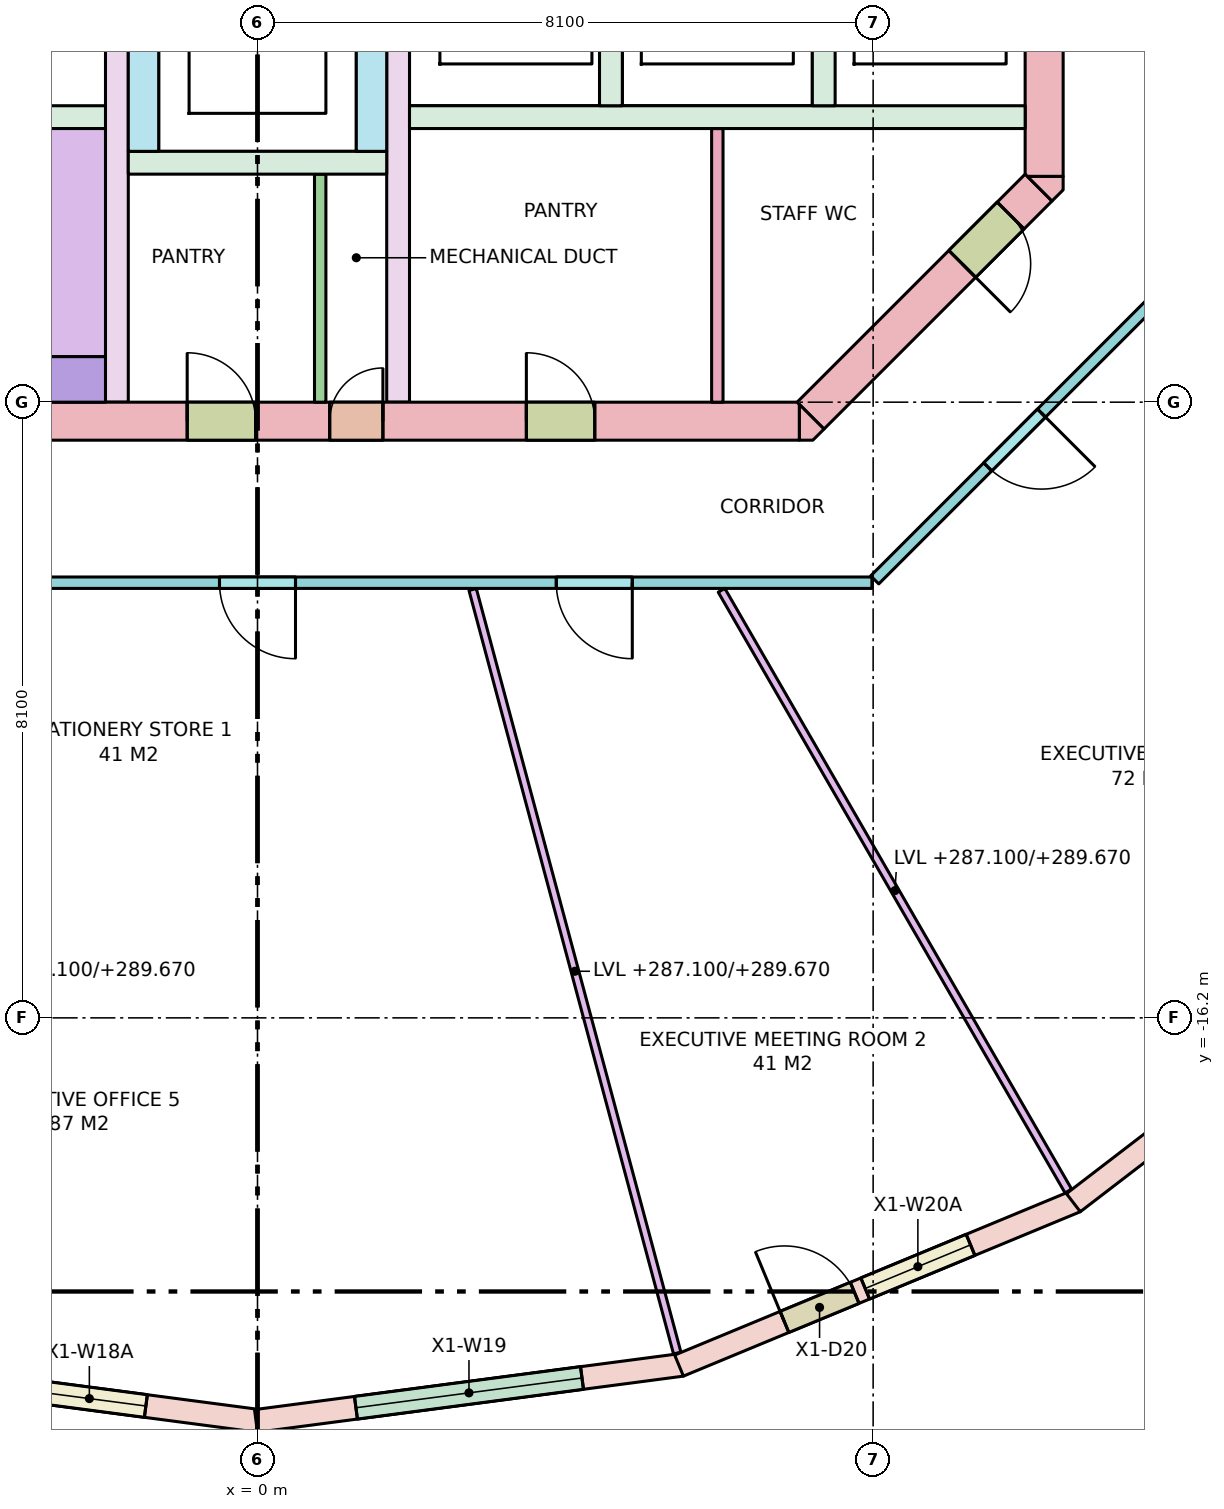
"""IFC4 building model, lengths in metres.
Left out: names, types, materials, properties, quantities, classifications, styles, units other than length and angle.
Written with IfcOpenShell. Run it as: python <this file> out.ifc"""

import sys

from ifc_helpers import new_model, si_unit, direction, frame, frame_2d, origin, place, context, subcontext, project, spatial, polyline, rectangle, outline, extrude, element, fill, save


model = new_model("IFC4")
c1 = context("Model", 3, precision=1e-05, world=origin(), true_north=direction((0.0, 1.0)))
c2 = subcontext(c1, "Body", "Model", "MODEL_VIEW")
j1 = project(units=[si_unit("LENGTHUNIT", "METRE"), si_unit("PLANEANGLEUNIT", "RADIAN")], contexts=[c1])
p1 = place(None, origin())
s1 = spatial("IfcSite", under=j1, at=p1, CompositionType="ELEMENT")
p2 = place(p1, origin())
s2 = spatial("IfcBuilding", under=s1, at=p2, CompositionType="ELEMENT")
p3 = place(p2, frame((0.0, 0.0, 287.1)))
s3 = spatial("IfcBuildingStorey", under=s2, at=p3, CompositionType="ELEMENT", Elevation=287.1)
p4 = place(p3, frame((-7.13, -8.35, -0.28), z_axis=(0.0, 0.0, 1.0), x_axis=(1.0, 0.0, 0.0)))
e1 = element("IfcWall", 1, at=p4, inside=s3, PredefinedType="SHEAR", context=c2, shape_type="SweptSolid", body=[
    extrude(rectangle(XDim=14.26, YDim=0.5, at=frame_2d((7.13, 0.0))), origin(), (0.0, 0.0, 1.0), 3.7),
])
p5 = place(p4, frame((8.08, 0.0, 0.28)))
e2 = element("IfcOpeningElement", 2, at=p5, cuts=e1, PredefinedType="OPENING", context=c2, shape_type="SweptSolid", body=[
    extrude(rectangle(XDim=0.7, YDim=2.1, at=frame_2d((0.35, 1.05))), frame((0.0, 0.26, 0.0), z_axis=(0.0, -1.0, 0.0), x_axis=(1.0, 0.0, 0.0)), (0.0, 0.0, 1.0), 0.52),
])
p6 = place(p4, frame((6.205, 0.0, 0.28)))
e3 = element("IfcOpeningElement", 3, at=p6, cuts=e1, PredefinedType="OPENING", context=c2, shape_type="SweptSolid", body=[
    extrude(rectangle(XDim=0.9, YDim=2.1, at=frame_2d((0.45, 1.05))), frame((0.0, 0.26, 0.0), z_axis=(0.0, -1.0, 0.0), x_axis=(1.0, 0.0, 0.0)), (0.0, 0.0, 1.0), 0.52),
])
p7 = place(p4, frame((10.667, 0.0, 0.28)))
e4 = element("IfcOpeningElement", 4, at=p7, cuts=e1, PredefinedType="OPENING", context=c2, shape_type="SweptSolid", body=[
    extrude(rectangle(XDim=0.9, YDim=2.1, at=frame_2d((0.45, 1.05))), frame((0.0, 0.26, 0.0), z_axis=(0.0, -1.0, 0.0), x_axis=(1.0, 0.0, 0.0)), (0.0, 0.0, 1.0), 0.52),
])
p8 = place(p3, frame((10.35, -5.13, -0.28), z_axis=(0.0, 0.0, 1.0), x_axis=(0.0, 1.0, 0.0)))
e5 = element("IfcWall", 5, at=p8, inside=s3, PredefinedType="SHEAR", context=c2, shape_type="SweptSolid", body=[
    extrude(rectangle(XDim=10.26, YDim=0.5, at=frame_2d((5.13, 0.0))), origin(), (0.0, 0.0, 1.0), 3.7),
])
p9 = place(p8, frame((4.13, 0.0, 0.28)))
e6 = element("IfcOpeningElement", 6, at=p9, cuts=e5, PredefinedType="OPENING", context=c2, shape_type="SweptSolid", body=[
    extrude(rectangle(XDim=2.0, YDim=2.1, at=frame_2d((1.0, 1.05))), frame((0.0, 0.26, 0.0), z_axis=(0.0, -1.0, 0.0), x_axis=(1.0, 0.0, 0.0)), (0.0, 0.0, 1.0), 0.52),
])
p10 = place(p3, frame((10.277, -5.277, -0.28), z_axis=(0.0, 0.0, 1.0), x_axis=(-0.707106781187, -0.707106781187, 0.0)))
e7 = element("IfcWall", 7, at=p10, inside=s3, PredefinedType="SHEAR", context=c2, shape_type="SweptSolid", body=[
    extrude(rectangle(XDim=4.243, YDim=0.5, at=frame_2d((2.121, 0.0))), origin(), (0.0, 0.0, 1.0), 3.7),
])
p11 = place(p10, frame((0.52, 0.0, 0.28)))
e8 = element("IfcOpeningElement", 8, at=p11, cuts=e7, PredefinedType="OPENING", context=c2, shape_type="SweptSolid", body=[
    extrude(rectangle(XDim=0.9, YDim=2.1, at=frame_2d((0.45, 1.05))), frame((0.0, 0.26, 0.0), z_axis=(0.0, -1.0, 0.0), x_axis=(1.0, 0.0, 0.0)), (0.0, 0.0, 1.0), 0.52),
])
p12 = place(p3, frame((0.0, 0.0, -0.28)))
e9 = element("IfcWall", 9, at=p12, inside=s3, PredefinedType="SHEAR", context=c2, shape_type="SweptSolid", body=[
    extrude(outline(polyline([(7.307, -8.6), (7.13, -8.6), (7.13, -8.13), (7.454, -8.454), (7.307, -8.6)])), origin(), (0.0, 0.0, 1.0), 3.7),
])
p13 = place(p3, frame((0.0, 0.0, -0.28)))
e10 = element("IfcWall", 10, at=p13, inside=s3, PredefinedType="SHEAR", context=c2, shape_type="SweptSolid", body=[
    extrude(outline(polyline([(10.6, -5.307), (10.454, -5.454), (10.13, -5.13), (10.6, -5.13), (10.6, -5.307)])), origin(), (0.0, 0.0, 1.0), 3.7),
])
for number, where, z_axis, x_axis in (
    (11, (-10.1, -4.35, 0.0), (0.0, 0.0, 1.0), (1.0, 0.0, 0.0)),
    (12, (2.0, -4.35, 0.0), (0.0, 0.0, 1.0), (1.0, 0.0, 0.0)),
):
    element("IfcWall", number, at=place(p3, frame(where, z_axis=z_axis, x_axis=x_axis)), inside=s3, PredefinedType="SOLIDWALL", context=c2, shape_type="SweptSolid", body=[
        extrude(rectangle(XDim=8.1, YDim=0.3, at=frame_2d((4.05, 0.0))), origin(), (0.0, 0.0, 1.0), 3.42),
    ])
for number, where, z_axis, x_axis in (
    (13, (4.65, -4.2, 0.0), (0.0, 0.0, 1.0), (0.0, 1.0, 0.0)),
    (14, (7.45, -4.2, 0.0), (0.0, 0.0, 1.0), (0.0, 1.0, 0.0)),
):
    element("IfcWall", number, at=place(p3, frame(where, z_axis=z_axis, x_axis=x_axis)), inside=s3, PredefinedType="SOLIDWALL", context=c2, shape_type="SweptSolid", body=[
        extrude(rectangle(XDim=2.4, YDim=0.3, at=frame_2d((1.2, 0.0))), origin(), (0.0, 0.0, 1.0), 3.42),
    ])
for number, where, z_axis, x_axis in (
    (15, (-1.85, -8.1, 0.0), (0.0, 0.0, 1.0), (0.0, 1.0, 0.0)),
    (16, (1.85, -8.1, 0.0), (0.0, 0.0, 1.0), (0.0, 1.0, 0.0)),
):
    element("IfcWall", number, at=place(p3, frame(where, z_axis=z_axis, x_axis=x_axis)), inside=s3, PredefinedType="SHEAR", context=c2, shape_type="SweptSolid", body=[
        extrude(rectangle(XDim=6.6, YDim=0.3, at=frame_2d((3.3, 0.0))), origin(), (0.0, 0.0, 1.0), 3.42),
    ])
for number, where, z_axis, x_axis in (
    (17, (-1.5, -4.8, 0.0), (0.0, 0.0, 1.0), (0.0, 1.0, 0.0)),
    (18, (1.5, -4.8, 0.0), (0.0, 0.0, 1.0), (0.0, 1.0, 0.0)),
):
    element("IfcWall", number, at=place(p3, frame(where, z_axis=z_axis, x_axis=x_axis)), inside=s3, PredefinedType="SOLIDWALL", context=c2, shape_type="SweptSolid", body=[
        extrude(rectangle(XDim=3.0, YDim=0.4, at=frame_2d((1.5, 0.0))), origin(), (0.0, 0.0, 1.0), 3.42),
    ])
p14 = place(p3, frame((-1.7, -4.95, 0.0), z_axis=(0.0, 0.0, 1.0), x_axis=(1.0, 0.0, 0.0)))
e19 = element("IfcWall", 19, at=p14, inside=s3, PredefinedType="SOLIDWALL", context=c2, shape_type="SweptSolid", body=[
    extrude(rectangle(XDim=3.4, YDim=0.3, at=frame_2d((1.7, 0.0))), origin(), (0.0, 0.0, 1.0), 3.42),
])
p15 = place(p3, frame((-7.37, -7.8, 0.0), z_axis=(0.0, 0.0, 1.0), x_axis=(1.0, 0.0, 0.0)))
e20 = element("IfcWall", 20, at=p15, inside=s3, PredefinedType="SHEAR", context=c2, shape_type="SweptSolid", body=[
    extrude(rectangle(XDim=5.37, YDim=0.6, at=frame_2d((2.685, 0.0))), origin(), (0.0, 0.0, 1.0), 3.42),
])
p16 = place(p3, frame((-5.584, -20.765, 0.0), z_axis=(0.0, 0.0, 1.0), x_axis=(0.991443853938, -0.130533844229, 0.0)))
e21 = element("IfcWall", 21, at=p16, inside=s3, PredefinedType="STANDARD", context=c2, shape_type="SweptSolid", body=[
    extrude(rectangle(XDim=5.652, YDim=0.3, at=frame_2d((2.826, 0.0))), origin(), (0.0, 0.0, 1.0), 3.42),
])
p17 = place(p16, frame((1.501, 0.0, 0.0)))
e22 = element("IfcOpeningElement", 22, at=p17, cuts=e21, PredefinedType="OPENING", context=c2, shape_type="SweptSolid", body=[
    extrude(rectangle(XDim=1.0, YDim=2.4, at=frame_2d((0.5, 1.2))), frame((0.0, 0.16, 0.0), z_axis=(0.0, -1.0, 0.0), x_axis=(1.0, 0.0, 0.0)), (0.0, 0.0, 1.0), 0.32),
])
p18 = place(p16, frame((2.651, 0.0, 0.8)))
e23 = element("IfcOpeningElement", 23, at=p18, cuts=e21, PredefinedType="OPENING", context=c2, shape_type="SweptSolid", body=[
    extrude(rectangle(XDim=1.5, YDim=2.4, at=frame_2d((0.75, 1.2))), frame((0.0, 0.16, 0.0), z_axis=(0.0, -1.0, 0.0), x_axis=(1.0, 0.0, 0.0)), (0.0, 0.0, 1.0), 0.32),
])
p19 = place(p3, frame((-0.02, -21.503, 0.0), z_axis=(0.0, 0.0, 1.0), x_axis=(0.991443853938, 0.130533844229, 0.0)))
e24 = element("IfcWall", 24, at=p19, inside=s3, PredefinedType="STANDARD", context=c2, shape_type="SweptSolid", body=[
    extrude(rectangle(XDim=5.652, YDim=0.3, at=frame_2d((2.826, 0.0))), origin(), (0.0, 0.0, 1.0), 3.42),
])
p20 = place(p19, frame((1.326, 0.0, 0.8)))
e25 = element("IfcOpeningElement", 25, at=p20, cuts=e24, PredefinedType="OPENING", context=c2, shape_type="SweptSolid", body=[
    extrude(rectangle(XDim=3.0, YDim=2.4, at=frame_2d((1.5, 1.2))), frame((0.0, 0.16, 0.0), z_axis=(0.0, -1.0, 0.0), x_axis=(1.0, 0.0, 0.0)), (0.0, 0.0, 1.0), 0.32),
])
p21 = place(p3, frame((5.546, -20.775, 0.0), z_axis=(0.0, 0.0, 1.0), x_axis=(0.923888907244, 0.382660798975, 0.0)))
e26 = element("IfcWall", 26, at=p21, inside=s3, PredefinedType="STANDARD", context=c2, shape_type="SweptSolid", body=[
    extrude(rectangle(XDim=5.652, YDim=0.3, at=frame_2d((2.826, 0.0))), origin(), (0.0, 0.0, 1.0), 3.42),
])
p22 = place(p21, frame((1.501, 0.0, 0.0)))
e27 = element("IfcOpeningElement", 27, at=p22, cuts=e26, PredefinedType="OPENING", context=c2, shape_type="SweptSolid", body=[
    extrude(rectangle(XDim=1.0, YDim=2.4, at=frame_2d((0.5, 1.2))), frame((0.0, 0.16, 0.0), z_axis=(0.0, -1.0, 0.0), x_axis=(1.0, 0.0, 0.0)), (0.0, 0.0, 1.0), 0.32),
])
p23 = place(p21, frame((2.651, 0.0, 0.8)))
e28 = element("IfcOpeningElement", 28, at=p23, cuts=e26, PredefinedType="OPENING", context=c2, shape_type="SweptSolid", body=[
    extrude(rectangle(XDim=1.5, YDim=2.4, at=frame_2d((0.75, 1.2))), frame((0.0, 0.16, 0.0), z_axis=(0.0, -1.0, 0.0), x_axis=(1.0, 0.0, 0.0)), (0.0, 0.0, 1.0), 0.32),
])
p24 = place(p3, frame((10.734, -18.632, 0.0), z_axis=(0.0, 0.0, 1.0), x_axis=(0.793363662257, 0.608747976925, 0.0)))
e29 = element("IfcWall", 29, at=p24, inside=s3, PredefinedType="STANDARD", context=c2, shape_type="SweptSolid", body=[
    extrude(rectangle(XDim=5.652, YDim=0.3, at=frame_2d((2.826, 0.0))), origin(), (0.0, 0.0, 1.0), 3.42),
])
p25 = place(p24, frame((1.326, 0.0, 0.8)))
e30 = element("IfcOpeningElement", 30, at=p25, cuts=e29, PredefinedType="OPENING", context=c2, shape_type="SweptSolid", body=[
    extrude(rectangle(XDim=3.0, YDim=2.4, at=frame_2d((1.5, 1.2))), frame((0.0, 0.16, 0.0), z_axis=(0.0, -1.0, 0.0), x_axis=(1.0, 0.0, 0.0)), (0.0, 0.0, 1.0), 0.32),
])
p26 = place(p3, frame((0.825, -8.1, 0.0), z_axis=(0.0, 0.0, 1.0), x_axis=(0.0, 1.0, 0.0)))
e31 = element("IfcWall", 31, at=p26, inside=s3, PredefinedType="PARTITIONING", context=c2, shape_type="SweptSolid", body=[
    extrude(rectangle(XDim=3.0, YDim=0.15, at=frame_2d((1.5, 0.0))), origin(), (0.0, 0.0, 1.0), 3.42),
])
p27 = place(p3, frame((6.05, -8.1, 0.0), z_axis=(0.0, 0.0, 1.0), x_axis=(0.0, 1.0, 0.0)))
e32 = element("IfcWall", 32, at=p27, inside=s3, PredefinedType="PARTITIONING", context=c2, shape_type="SweptSolid", body=[
    extrude(rectangle(XDim=3.6, YDim=0.15, at=frame_2d((1.8, 0.0))), origin(), (0.0, 0.0, 1.0), 3.42),
])
p28 = place(p3, frame((12.438, -6.121, 0.0), z_axis=(0.0, 0.0, 1.0), x_axis=(-0.707106781187, -0.707106781187, 0.0)))
e33 = element("IfcWall", 33, at=p28, inside=s3, PredefinedType="PARTITIONING", context=c2, shape_type="SweptSolid", body=[
    extrude(rectangle(XDim=6.105, YDim=0.15, at=frame_2d((3.053, 0.0))), origin(), (0.0, 0.0, 1.0), 2.57),
])
p29 = place(p28, frame((3.002, 0.0, 0.0)))
e34 = element("IfcOpeningElement", 34, at=p29, cuts=e33, PredefinedType="OPENING", context=c2, shape_type="SweptSolid", body=[
    extrude(rectangle(XDim=1.0, YDim=2.1, at=frame_2d((0.5, 1.05))), frame((0.0, 0.085, 0.0), z_axis=(0.0, -1.0, 0.0), x_axis=(1.0, 0.0, 0.0)), (0.0, 0.0, 1.0), 0.17),
])
p30 = place(p3, frame((8.084, -10.475, 0.0), z_axis=(0.0, 0.0, 1.0), x_axis=(-1.0, 0.0, 0.0)))
e35 = element("IfcWall", 35, at=p30, inside=s3, PredefinedType="PARTITIONING", context=c2, shape_type="SweptSolid", body=[
    extrude(rectangle(XDim=16.167, YDim=0.15, at=frame_2d((8.084, 0.0))), origin(), (0.0, 0.0, 1.0), 2.57),
])
p31 = place(p30, frame((12.065, 0.0, 0.0)))
e36 = element("IfcOpeningElement", 36, at=p31, cuts=e35, PredefinedType="OPENING", context=c2, shape_type="SweptSolid", body=[
    extrude(rectangle(XDim=0.9, YDim=2.1, at=frame_2d((0.45, 1.05))), frame((0.0, 0.085, 0.0), z_axis=(0.0, -1.0, 0.0), x_axis=(1.0, 0.0, 0.0)), (0.0, 0.0, 1.0), 0.17),
])
p32 = place(p30, frame((7.584, 0.0, 0.0)))
e37 = element("IfcOpeningElement", 37, at=p32, cuts=e35, PredefinedType="OPENING", context=c2, shape_type="SweptSolid", body=[
    extrude(rectangle(XDim=1.0, YDim=2.1, at=frame_2d((0.5, 1.05))), frame((0.0, 0.085, 0.0), z_axis=(0.0, -1.0, 0.0), x_axis=(1.0, 0.0, 0.0)), (0.0, 0.0, 1.0), 0.17),
])
p33 = place(p30, frame((3.153, 0.0, 0.0)))
e38 = element("IfcOpeningElement", 38, at=p33, cuts=e35, PredefinedType="OPENING", context=c2, shape_type="SweptSolid", body=[
    extrude(rectangle(XDim=1.0, YDim=2.1, at=frame_2d((0.5, 1.05))), frame((0.0, 0.085, 0.0), z_axis=(0.0, -1.0, 0.0), x_axis=(1.0, 0.0, 0.0)), (0.0, 0.0, 1.0), 0.17),
])
p34 = place(p3, frame((2.831, -10.564, 0.0), z_axis=(0.0, 0.0, 1.0), x_axis=(0.258796321138, -0.965931914871, 0.0)))
e39 = element("IfcWall", 39, at=p34, inside=s3, PredefinedType="PARTITIONING", context=c2, shape_type="SweptSolid", body=[
    extrude(rectangle(XDim=10.4, YDim=0.1, at=frame_2d((5.2, 0.0))), origin(), (0.0, 0.0, 1.0), 2.57),
])
p35 = place(p3, frame((6.105, -10.575, 0.0), z_axis=(0.0, 0.0, 1.0), x_axis=(0.500020406621, -0.866013621696, 0.0)))
e40 = element("IfcWall", 40, at=p35, inside=s3, PredefinedType="PARTITIONING", context=c2, shape_type="SweptSolid", body=[
    extrude(rectangle(XDim=9.126, YDim=0.1, at=frame_2d((4.563, 0.0))), origin(), (0.0, 0.0, 1.0), 2.57),
])
p36 = place(p18, origin())
e41 = element("IfcWindow", 41, at=p36, inside=s3, PartitioningType="SINGLE_PANEL", PredefinedType="WINDOW", context=c2, shape_type="SweptSolid", body=[
    extrude(rectangle(XDim=1.5, YDim=2.4, at=frame_2d((0.75, 1.2))), frame((0.0, 0.03, 0.0), z_axis=(0.0, -1.0, 0.0), x_axis=(1.0, 0.0, 0.0)), (0.0, 0.0, 1.0), 0.06),
])
fill(e23, e41)
p37 = place(p20, origin())
e42 = element("IfcWindow", 42, at=p37, inside=s3, PartitioningType="SINGLE_PANEL", PredefinedType="WINDOW", context=c2, shape_type="SweptSolid", body=[
    extrude(rectangle(XDim=3.0, YDim=2.4, at=frame_2d((1.5, 1.2))), frame((0.0, 0.03, 0.0), z_axis=(0.0, -1.0, 0.0), x_axis=(1.0, 0.0, 0.0)), (0.0, 0.0, 1.0), 0.06),
])
fill(e25, e42)
p38 = place(p22, origin())
e43 = element("IfcDoor", 43, at=p38, inside=s3, OperationType="SINGLE_SWING_LEFT", PredefinedType="DOOR", context=c2, shape_type="SweptSolid", body=[
    extrude(rectangle(XDim=1.0, YDim=2.4, at=frame_2d((0.5, 1.2))), frame((0.0, 0.025, 0.0), z_axis=(0.0, -1.0, 0.0), x_axis=(1.0, 0.0, 0.0)), (0.0, 0.0, 1.0), 0.05),
])
fill(e27, e43)
p39 = place(p23, origin())
e44 = element("IfcWindow", 44, at=p39, inside=s3, PartitioningType="SINGLE_PANEL", PredefinedType="WINDOW", context=c2, shape_type="SweptSolid", body=[
    extrude(rectangle(XDim=1.5, YDim=2.4, at=frame_2d((0.75, 1.2))), frame((0.0, 0.03, 0.0), z_axis=(0.0, -1.0, 0.0), x_axis=(1.0, 0.0, 0.0)), (0.0, 0.0, 1.0), 0.06),
])
fill(e28, e44)
p40 = place(p5, origin())
e45 = element("IfcDoor", 45, at=p40, inside=s3, OperationType="SINGLE_SWING_RIGHT", PredefinedType="DOOR", context=c2, shape_type="SweptSolid", body=[
    extrude(rectangle(XDim=0.7, YDim=2.1, at=frame_2d((0.35, 1.05))), frame((0.0, 0.025, 0.0), z_axis=(0.0, -1.0, 0.0), x_axis=(1.0, 0.0, 0.0)), (0.0, 0.0, 1.0), 0.05),
])
fill(e2, e45)
p41 = place(p6, origin())
e46 = element("IfcDoor", 46, at=p41, inside=s3, OperationType="SINGLE_SWING_LEFT", PredefinedType="DOOR", context=c2, shape_type="SweptSolid", body=[
    extrude(rectangle(XDim=0.9, YDim=2.1, at=frame_2d((0.45, 1.05))), frame((0.0, 0.025, 0.0), z_axis=(0.0, -1.0, 0.0), x_axis=(1.0, 0.0, 0.0)), (0.0, 0.0, 1.0), 0.05),
])
fill(e3, e46)
p42 = place(p7, origin())
e47 = element("IfcDoor", 47, at=p42, inside=s3, OperationType="SINGLE_SWING_LEFT", PredefinedType="DOOR", context=c2, shape_type="SweptSolid", body=[
    extrude(rectangle(XDim=0.9, YDim=2.1, at=frame_2d((0.45, 1.05))), frame((0.0, 0.025, 0.0), z_axis=(0.0, -1.0, 0.0), x_axis=(1.0, 0.0, 0.0)), (0.0, 0.0, 1.0), 0.05),
])
fill(e4, e47)
p43 = place(p11, origin())
e48 = element("IfcDoor", 48, at=p43, inside=s3, OperationType="SINGLE_SWING_RIGHT", PredefinedType="DOOR", context=c2, shape_type="SweptSolid", body=[
    extrude(rectangle(XDim=0.9, YDim=2.1, at=frame_2d((0.45, 1.05))), frame((0.0, 0.025, 0.0), z_axis=(0.0, -1.0, 0.0), x_axis=(1.0, 0.0, 0.0)), (0.0, 0.0, 1.0), 0.05),
])
fill(e8, e48)
p44 = place(p29, origin())
e49 = element("IfcDoor", 49, at=p44, inside=s3, OperationType="SINGLE_SWING_LEFT", PredefinedType="DOOR", context=c2, shape_type="SweptSolid", body=[
    extrude(rectangle(XDim=1.0, YDim=2.1, at=frame_2d((0.5, 1.05))), frame((0.0, 0.025, 0.0), z_axis=(0.0, -1.0, 0.0), x_axis=(1.0, 0.0, 0.0)), (0.0, 0.0, 1.0), 0.05),
])
fill(e34, e49)
p45 = place(p32, origin())
e50 = element("IfcDoor", 50, at=p45, inside=s3, OperationType="SINGLE_SWING_LEFT", PredefinedType="DOOR", context=c2, shape_type="SweptSolid", body=[
    extrude(rectangle(XDim=1.0, YDim=2.1, at=frame_2d((0.5, 1.05))), frame((0.0, 0.025, 0.0), z_axis=(0.0, -1.0, 0.0), x_axis=(1.0, 0.0, 0.0)), (0.0, 0.0, 1.0), 0.05),
])
fill(e37, e50)
p46 = place(p33, origin())
e51 = element("IfcDoor", 51, at=p46, inside=s3, OperationType="SINGLE_SWING_LEFT", PredefinedType="DOOR", context=c2, shape_type="SweptSolid", body=[
    extrude(rectangle(XDim=1.0, YDim=2.1, at=frame_2d((0.5, 1.05))), frame((0.0, 0.025, 0.0), z_axis=(0.0, -1.0, 0.0), x_axis=(1.0, 0.0, 0.0)), (0.0, 0.0, 1.0), 0.05),
])
fill(e38, e51)
save(model, sys.argv[1])
